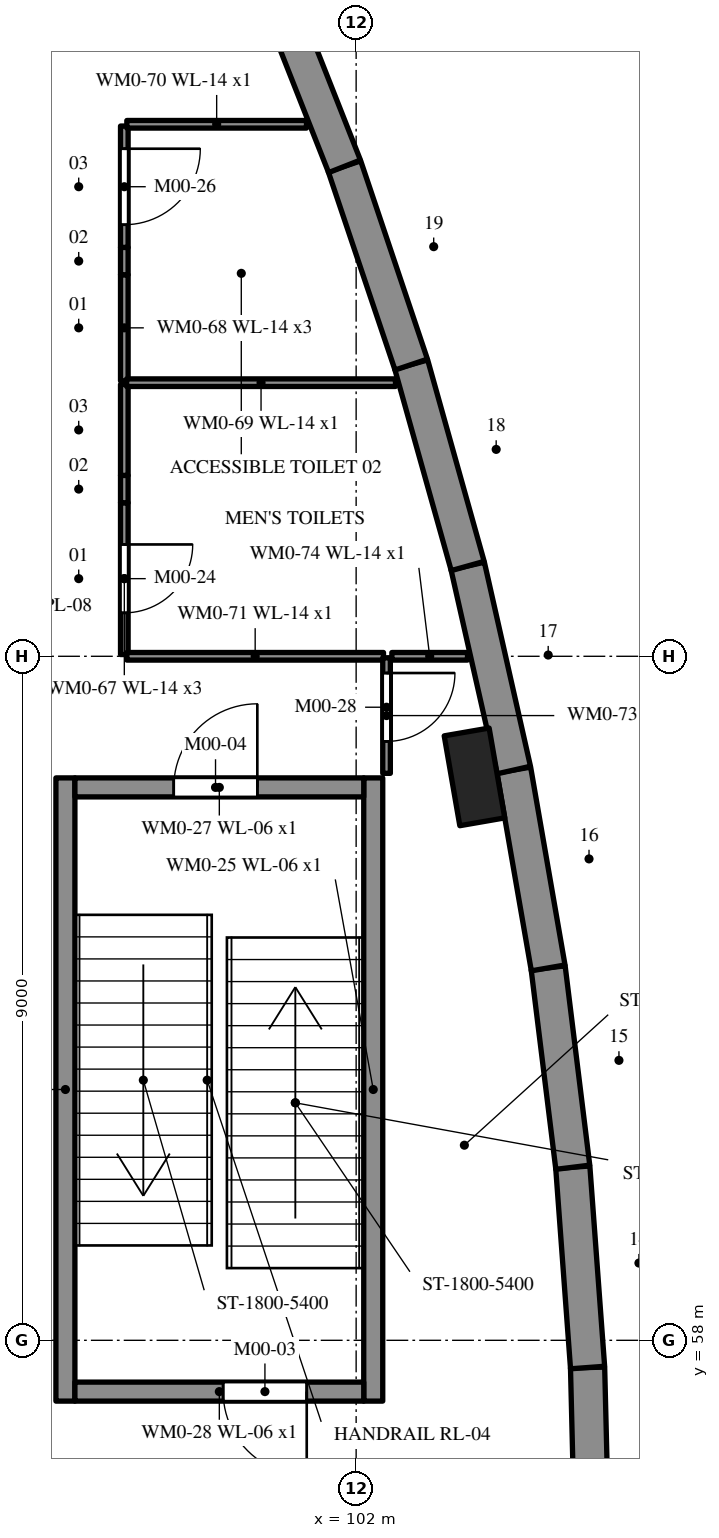
"""IFC4 building model, lengths in metres.
Left out: names, types, materials, properties, quantities, classifications, styles, units other than length and angle.
Written with IfcOpenShell. Run it as: python <this file> out.ifc"""

import sys

from ifc_helpers import new_model, si_unit, direction, frame, frame_2d, origin, origin_2d, place, context, subcontext, project, spatial, polyline, rectangle, outline, extrude, element, fill, save


model = new_model("IFC4")
c1 = context("Model", 3, precision=1e-05, world=origin(), true_north=direction((0.0, 1.0)))
c2 = subcontext(c1, "Body", "Model", "MODEL_VIEW")
j1 = project(units=[si_unit("LENGTHUNIT", "METRE"), si_unit("PLANEANGLEUNIT", "RADIAN")], contexts=[c1])
p1 = place(None, origin())
s1 = spatial("IfcSite", under=j1, at=p1, CompositionType="ELEMENT")
p2 = place(p1, origin())
s2 = spatial("IfcBuilding", under=s1, at=p2, CompositionType="ELEMENT")
p3 = place(p2, origin())
s3 = spatial("IfcBuildingStorey", under=s2, at=p3, CompositionType="ELEMENT", Elevation=0.0)
p4 = place(p3, frame((105.11, 55.0, 0.0), z_axis=(0.0, 0.0, 1.0), x_axis=(-0.024666736886, 0.999695729756, 0.0)))
e1 = element("IfcWall", 1, at=p4, inside=s3, PredefinedType="SOLIDWALL", context=c2, shape_type="SweptSolid", body=[
    extrude(rectangle(XDim=2.643, YDim=0.45, at=frame_2d((1.321, 0.0))), origin(), (0.0, 0.0, 1.0), 5.4),
])
p5 = place(p3, frame((105.045, 57.642, 0.0), z_axis=(0.0, 0.0, 1.0), x_axis=(-0.07363685767, 0.997285121313, 0.0)))
e2 = element("IfcWall", 2, at=p5, inside=s3, PredefinedType="SOLIDWALL", context=c2, shape_type="SweptSolid", body=[
    extrude(rectangle(XDim=2.642, YDim=0.45, at=frame_2d((1.321, 0.0))), origin(), (0.0, 0.0, 1.0), 5.4),
])
p6 = place(p3, frame((104.85, 60.277, 0.0), z_axis=(0.0, 0.0, 1.0), x_axis=(-0.122499610212, 0.992468561466, 0.0)))
e3 = element("IfcWall", 3, at=p6, inside=s3, PredefinedType="SOLIDWALL", context=c2, shape_type="SweptSolid", body=[
    extrude(rectangle(XDim=2.643, YDim=0.45, at=frame_2d((1.321, 0.0))), origin(), (0.0, 0.0, 1.0), 5.4),
])
p7 = place(p3, frame((104.527, 62.9, 0.0), z_axis=(0.0, 0.0, 1.0), x_axis=(-0.171196910379, 0.985236833394, 0.0)))
e4 = element("IfcWall", 4, at=p7, inside=s3, PredefinedType="SOLIDWALL", context=c2, shape_type="SweptSolid", body=[
    extrude(rectangle(XDim=2.643, YDim=0.45, at=frame_2d((1.321, 0.0))), origin(), (0.0, 0.0, 1.0), 5.4),
])
p8 = place(p3, frame((104.074, 65.503, 0.0), z_axis=(0.0, 0.0, 1.0), x_axis=(-0.220347996563, 0.975421324562, 0.0)))
e5 = element("IfcWall", 5, at=p8, inside=s3, PredefinedType="SOLIDWALL", context=c2, shape_type="SweptSolid", body=[
    extrude(rectangle(XDim=2.752, YDim=0.45, at=frame_2d((1.376, 0.0))), origin(), (0.0, 0.0, 1.0), 5.4),
])
for number, where, z_axis, x_axis in (
    (6, (103.468, 68.188, 0.0), (0.0, 0.0, 1.0), (-0.27, 0.963, 0.0)),
    (7, (102.725, 70.838, 0.0), (0.0, 0.0, 1.0), (-0.319, 0.948, 0.0)),
):
    element("IfcWall", number, at=place(p3, frame(where, z_axis=z_axis, x_axis=x_axis)), inside=s3, PredefinedType="SOLIDWALL", context=c2, shape_type="SweptSolid", body=[
        extrude(rectangle(XDim=2.752, YDim=0.45, at=frame_2d((1.376, 0.0))), origin(), (0.0, 0.0, 1.0), 5.4),
    ])
p9 = place(p3, frame((101.847, 73.447, 0.0), z_axis=(0.0, 0.0, 1.0), x_axis=(-0.366920100653, 0.930252460215, 0.0)))
e8 = element("IfcWall", 8, at=p9, inside=s3, PredefinedType="SOLIDWALL", context=c2, shape_type="SweptSolid", body=[
    extrude(rectangle(XDim=2.752, YDim=0.45, at=frame_2d((1.376, 0.0))), origin(), (0.0, 0.0, 1.0), 5.4),
])
p10 = place(p3, frame((103.557, 65.414, 0.0), z_axis=(0.0, 0.0, 1.0), x_axis=(-0.171172540003, 0.985241067734, 0.0)))
e9 = element("IfcColumn", 9, at=p10, inside=s3, PredefinedType="PILASTER", context=c2, shape_type="SweptSolid", body=[
    extrude(rectangle(XDim=1.2, YDim=0.6, at=origin_2d()), origin(), (0.0, 0.0, 1.0), 5.4),
])
for number, where, z_axis, x_axis in (
    (10, (102.225, 57.2, 0.0), (0.0, 0.0, 1.0), (0.0, 1.0, 0.0)),
    (11, (98.175, 65.4, 0.0), (0.0, 0.0, 1.0), (0.0, -1.0, 0.0)),
):
    element("IfcWall", number, at=place(p3, frame(where, z_axis=z_axis, x_axis=x_axis)), inside=s3, PredefinedType="SHEAR", context=c2, shape_type="SweptSolid", body=[
        extrude(rectangle(XDim=8.2, YDim=0.25, at=frame_2d((4.1, 0.0))), origin(), (0.0, 0.0, 1.0), 5.4),
    ])
p11 = place(p3, frame((98.3, 65.275, 0.0), z_axis=(0.0, 0.0, 1.0), x_axis=(1.0, 0.0, 0.0)))
e12 = element("IfcWall", 12, at=p11, inside=s3, PredefinedType="SHEAR", context=c2, shape_type="SweptSolid", body=[
    extrude(rectangle(XDim=3.8, YDim=0.25, at=frame_2d((1.9, 0.0))), origin(), (0.0, 0.0, 1.0), 5.4),
])
p12 = place(p11, frame((1.3, 0.0, 0.0)))
e13 = element("IfcOpeningElement", 13, at=p12, cuts=e12, PredefinedType="OPENING", context=c2, shape_type="SweptSolid", body=[
    extrude(rectangle(XDim=1.1, YDim=2.1, at=frame_2d((0.55, 1.05))), frame((0.0, 0.135, 0.0), z_axis=(0.0, -1.0, 0.0), x_axis=(1.0, 0.0, 0.0)), (0.0, 0.0, 1.0), 0.27),
])
p13 = place(p3, frame((102.1, 57.325, 0.0), z_axis=(0.0, 0.0, 1.0), x_axis=(-1.0, 0.0, 0.0)))
e14 = element("IfcWall", 14, at=p13, inside=s3, PredefinedType="SHEAR", context=c2, shape_type="SweptSolid", body=[
    extrude(rectangle(XDim=3.8, YDim=0.25, at=frame_2d((1.9, 0.0))), origin(), (0.0, 0.0, 1.0), 5.4),
])
p14 = place(p13, frame((0.75, 0.0, 0.0)))
e15 = element("IfcOpeningElement", 15, at=p14, cuts=e14, PredefinedType="OPENING", context=c2, shape_type="SweptSolid", body=[
    extrude(rectangle(XDim=1.1, YDim=2.1, at=frame_2d((0.55, 1.05))), frame((0.0, 0.135, 0.0), z_axis=(0.0, -1.0, 0.0), x_axis=(1.0, 0.0, 0.0)), (0.0, 0.0, 1.0), 0.27),
])
p15 = place(p3, frame((98.95, 67.023, 0.0), z_axis=(0.0, 0.0, 1.0), x_axis=(0.0, 1.0, 0.0)))
e16 = element("IfcWall", 16, at=p15, inside=s3, PredefinedType="PARTITIONING", context=c2, shape_type="SweptSolid", body=[
    extrude(rectangle(XDim=1.997, YDim=0.1, at=frame_2d((0.999, 0.0))), origin(), (0.0, 0.0, 1.0), 5.15),
])
p16 = place(p15, frame((0.549, 0.0, 0.0)))
e17 = element("IfcOpeningElement", 17, at=p16, cuts=e16, PredefinedType="OPENING", context=c2, shape_type="SweptSolid", body=[
    extrude(rectangle(XDim=0.9, YDim=2.1, at=frame_2d((0.45, 1.05))), frame((0.0, 0.06, 0.0), z_axis=(0.0, -1.0, 0.0), x_axis=(1.0, 0.0, 0.0)), (0.0, 0.0, 1.0), 0.12),
])
p17 = place(p3, frame((98.95, 69.02, 0.0), z_axis=(0.0, 0.0, 1.0), x_axis=(0.0, 1.0, 0.0)))
e18 = element("IfcWall", 18, at=p17, inside=s3, PredefinedType="PARTITIONING", context=c2, shape_type="SweptSolid", body=[
    extrude(rectangle(XDim=0.36, YDim=0.1, at=frame_2d((0.18, 0.0))), origin(), (0.0, 0.0, 1.0), 4.52),
])
p18 = place(p3, frame((98.95, 69.38, 0.0), z_axis=(0.0, 0.0, 1.0), x_axis=(0.0, 1.0, 0.0)))
e19 = element("IfcWall", 19, at=p18, inside=s3, PredefinedType="PARTITIONING", context=c2, shape_type="SweptSolid", body=[
    extrude(rectangle(XDim=1.197, YDim=0.1, at=frame_2d((0.599, 0.0))), origin(), (0.0, 0.0, 1.0), 5.15),
])
p19 = place(p3, frame((98.95, 70.623, 0.0), z_axis=(0.0, 0.0, 1.0), x_axis=(0.0, 1.0, 0.0)))
e20 = element("IfcWall", 20, at=p19, inside=s3, PredefinedType="PARTITIONING", context=c2, shape_type="SweptSolid", body=[
    extrude(rectangle(XDim=1.397, YDim=0.1, at=frame_2d((0.698, 0.0))), origin(), (0.0, 0.0, 1.0), 5.15),
])
p20 = place(p3, frame((98.95, 72.02, 0.0), z_axis=(0.0, 0.0, 1.0), x_axis=(0.0, 1.0, 0.0)))
e21 = element("IfcWall", 21, at=p20, inside=s3, PredefinedType="PARTITIONING", context=c2, shape_type="SweptSolid", body=[
    extrude(rectangle(XDim=0.36, YDim=0.1, at=frame_2d((0.18, 0.0))), origin(), (0.0, 0.0, 1.0), 4.52),
])
p21 = place(p3, frame((98.95, 72.38, 0.0), z_axis=(0.0, 0.0, 1.0), x_axis=(0.0, 1.0, 0.0)))
e22 = element("IfcWall", 22, at=p21, inside=s3, PredefinedType="PARTITIONING", context=c2, shape_type="SweptSolid", body=[
    extrude(rectangle(XDim=1.597, YDim=0.1, at=frame_2d((0.798, 0.0))), origin(), (0.0, 0.0, 1.0), 5.15),
])
p22 = place(p21, frame((0.298, 0.0, 0.0)))
e23 = element("IfcOpeningElement", 23, at=p22, cuts=e22, PredefinedType="OPENING", context=c2, shape_type="SweptSolid", body=[
    extrude(rectangle(XDim=1.0, YDim=2.1, at=frame_2d((0.5, 1.05))), frame((0.0, 0.06, 0.0), z_axis=(0.0, -1.0, 0.0), x_axis=(1.0, 0.0, 0.0)), (0.0, 0.0, 1.0), 0.12),
])
p23 = place(p3, frame((98.98, 70.6, 0.0), z_axis=(0.0, 0.0, 1.0), x_axis=(1.0, 0.0, 0.0)))
e24 = element("IfcWall", 24, at=p23, inside=s3, PredefinedType="PARTITIONING", context=c2, shape_type="SweptSolid", body=[
    extrude(rectangle(XDim=3.538, YDim=0.1, at=frame_2d((1.769, 0.0))), origin(), (0.0, 0.0, 1.0), 5.15),
])
p24 = place(p3, frame((98.983, 74.0, 0.0), z_axis=(0.0, 0.0, 1.0), x_axis=(1.0, 0.0, 0.0)))
e25 = element("IfcWall", 25, at=p24, inside=s3, PredefinedType="PARTITIONING", context=c2, shape_type="SweptSolid", body=[
    extrude(rectangle(XDim=2.364, YDim=0.1, at=frame_2d((1.182, 0.0))), origin(), (0.0, 0.0, 1.0), 5.15),
])
p25 = place(p3, frame((102.36, 67.0, 0.0), z_axis=(0.0, 0.0, 1.0), x_axis=(-1.0, 0.0, 0.0)))
e26 = element("IfcWall", 26, at=p25, inside=s3, PredefinedType="PARTITIONING", context=c2, shape_type="SweptSolid", body=[
    extrude(rectangle(XDim=3.377, YDim=0.1, at=frame_2d((1.688, 0.0))), origin(), (0.0, 0.0, 1.0), 5.15),
])
p26 = place(p3, frame((102.4, 65.46, 0.0), z_axis=(0.0, 0.0, 1.0), x_axis=(0.0, 1.0, 0.0)))
e27 = element("IfcWall", 27, at=p26, inside=s3, PredefinedType="PARTITIONING", context=c2, shape_type="SweptSolid", body=[
    extrude(outline(polyline([(0.0, 0.0), (1.52, 0.0), (1.52, 5.15), (0.947, 5.15), (0.945, 4.42), (0.535, 4.42), (0.533, 5.15), (0.0, 5.15), (0.0, 0.0)])), frame((0.0, 0.05, 0.0), z_axis=(0.0, -1.0, 0.0), x_axis=(1.0, 0.0, 0.0)), (0.0, 0.0, 1.0), 0.1),
])
p27 = place(p26, frame((0.42, 0.0, 0.0)))
e28 = element("IfcOpeningElement", 28, at=p27, cuts=e27, PredefinedType="OPENING", context=c2, shape_type="SweptSolid", body=[
    extrude(rectangle(XDim=0.9, YDim=2.1, at=frame_2d((0.45, 1.05))), frame((0.0, 0.06, 0.0), z_axis=(0.0, -1.0, 0.0), x_axis=(1.0, 0.0, 0.0)), (0.0, 0.0, 1.0), 0.12),
])
p28 = place(p3, frame((103.465, 67.0, 0.0), z_axis=(0.0, 0.0, 1.0), x_axis=(-1.0, 0.0, 0.0)))
e29 = element("IfcWall", 29, at=p28, inside=s3, PredefinedType="PARTITIONING", context=c2, shape_type="SweptSolid", body=[
    extrude(rectangle(XDim=0.995, YDim=0.1, at=frame_2d((0.498, 0.0))), origin(), (0.0, 0.0, 1.0), 5.15),
])
p29 = place(p14, origin())
e30 = element("IfcDoor", 30, at=p29, inside=s3, OperationType="SINGLE_SWING_LEFT", PredefinedType="DOOR", context=c2, shape_type="SweptSolid", body=[
    extrude(rectangle(XDim=1.1, YDim=2.1, at=frame_2d((0.55, 1.05))), frame((0.0, 0.025, 0.0), z_axis=(0.0, -1.0, 0.0), x_axis=(1.0, 0.0, 0.0)), (0.0, 0.0, 1.0), 0.05),
])
fill(e15, e30)
p30 = place(p12, origin())
e31 = element("IfcDoor", 31, at=p30, inside=s3, OperationType="SINGLE_SWING_RIGHT", PredefinedType="DOOR", context=c2, shape_type="SweptSolid", body=[
    extrude(rectangle(XDim=1.1, YDim=2.1, at=frame_2d((0.55, 1.05))), frame((0.0, 0.025, 0.0), z_axis=(0.0, -1.0, 0.0), x_axis=(1.0, 0.0, 0.0)), (0.0, 0.0, 1.0), 0.05),
])
fill(e13, e31)
p31 = place(p16, frame((0.9, 0.0, 0.0), z_axis=(0.0, 0.0, 1.0), x_axis=(-1.0, 0.0, 0.0)))
e32 = element("IfcDoor", 32, at=p31, inside=s3, OperationType="SINGLE_SWING_LEFT", PredefinedType="DOOR", context=c2, shape_type="SweptSolid", body=[
    extrude(rectangle(XDim=0.9, YDim=2.1, at=frame_2d((0.45, 1.05))), frame((0.0, 0.025, 0.0), z_axis=(0.0, -1.0, 0.0), x_axis=(1.0, 0.0, 0.0)), (0.0, 0.0, 1.0), 0.05),
])
fill(e17, e32)
p32 = place(p22, frame((1.0, 0.0, 0.0), z_axis=(0.0, 0.0, 1.0), x_axis=(-1.0, 0.0, 0.0)))
e33 = element("IfcDoor", 33, at=p32, inside=s3, OperationType="SINGLE_SWING_LEFT", PredefinedType="DOOR", context=c2, shape_type="SweptSolid", body=[
    extrude(rectangle(XDim=1.0, YDim=2.1, at=frame_2d((0.5, 1.05))), frame((0.0, 0.025, 0.0), z_axis=(0.0, -1.0, 0.0), x_axis=(1.0, 0.0, 0.0)), (0.0, 0.0, 1.0), 0.05),
])
fill(e23, e33)
p33 = place(p27, frame((0.9, 0.0, 0.0), z_axis=(0.0, 0.0, 1.0), x_axis=(-1.0, 0.0, 0.0)))
e34 = element("IfcDoor", 34, at=p33, inside=s3, OperationType="SINGLE_SWING_LEFT", PredefinedType="DOOR", context=c2, shape_type="SweptSolid", body=[
    extrude(rectangle(XDim=0.9, YDim=2.1, at=frame_2d((0.45, 1.05))), frame((0.0, 0.025, 0.0), z_axis=(0.0, -1.0, 0.0), x_axis=(1.0, 0.0, 0.0)), (0.0, 0.0, 1.0), 0.05),
])
fill(e28, e34)
save(model, sys.argv[1])
